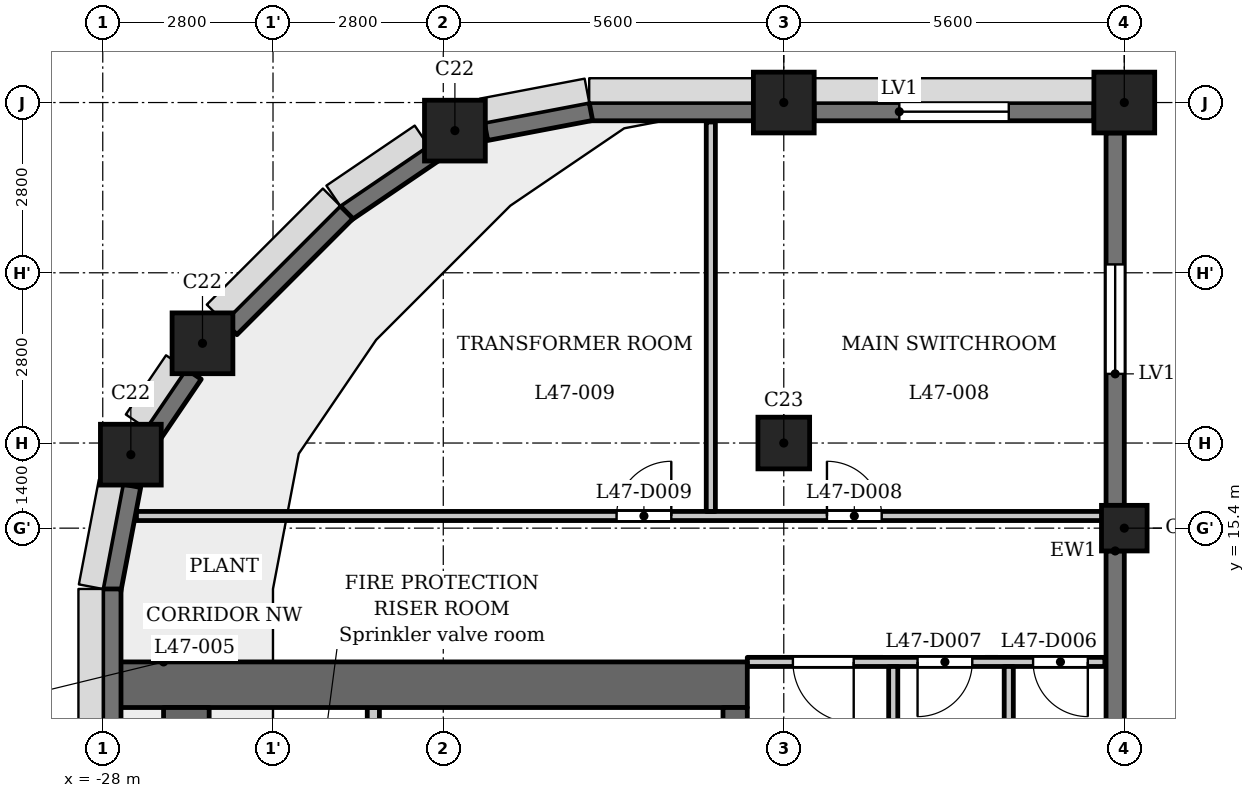
"""IFC4 building model, lengths in metres.
Left out: names, types, materials, properties, quantities, classifications, styles, units other than length and angle.
Written with IfcOpenShell. Run it as: python <this file> out.ifc"""

import sys

from ifc_helpers import new_model, si_unit, direction, frame, frame_2d, origin, origin_2d, place, context, subcontext, project, spatial, rectangle, extrude, element, fill, save


model = new_model("IFC4")
c1 = context("Model", 3, precision=1e-05, world=origin(), true_north=direction((0.0, 1.0)))
c2 = subcontext(c1, "Body", "Model", "MODEL_VIEW")
j1 = project(units=[si_unit("LENGTHUNIT", "METRE"), si_unit("PLANEANGLEUNIT", "RADIAN")], contexts=[c1])
p1 = place(None, origin())
s1 = spatial("IfcSite", under=j1, at=p1, CompositionType="ELEMENT")
p2 = place(p1, origin())
s2 = spatial("IfcBuilding", under=s1, at=p2, CompositionType="ELEMENT")
p3 = place(p2, frame((0.0, 0.0, 183.5)))
s3 = spatial("IfcBuildingStorey", under=s2, at=p3, CompositionType="ELEMENT", Elevation=183.5)
for number, where, z_axis, x_axis in (
    (1, (-11.2, 22.4, 0.0), (0.0, 0.0, 1.0), (1.0, 0.0, 0.0)),
    (2, (-16.8, 22.4, 0.0), (0.0, 0.0, 1.0), (1.0, 0.0, 0.0)),
    (3, (-22.209, 21.938, 0.0), (0.0, 0.0, 1.0), (1.0, 0.0, 0.0)),
    (4, (-26.36, 18.44, 0.0), (0.0, 0.0, 1.0), (1.0, 0.0, 0.0)),
    (5, (-27.538, 16.609, 0.0), (0.0, 0.0, 1.0), (1.0, 0.0, 0.0)),
):
    element("IfcColumn", number, at=place(p3, frame(where, z_axis=z_axis, x_axis=x_axis)), inside=s3, PredefinedType="COLUMN", context=c2, shape_type="SweptSolid", body=[
        extrude(rectangle(XDim=1.0, YDim=1.0, at=origin_2d()), origin(), (0.0, 0.0, 1.0), 5.4),
    ])
p4 = place(p3, frame((-16.8, 16.8, 0.0), z_axis=(0.0, 0.0, 1.0), x_axis=(1.0, 0.0, 0.0)))
e6 = element("IfcColumn", 6, at=p4, inside=s3, PredefinedType="COLUMN", context=c2, shape_type="SweptSolid", body=[
    extrude(rectangle(XDim=0.85, YDim=0.85, at=origin_2d()), origin(), (0.0, 0.0, 1.0), 5.4),
])
p5 = place(p3, frame((-11.2, 15.4, 0.0), z_axis=(0.0, 0.0, 1.0), x_axis=(1.0, 0.0, 0.0)))
e7 = element("IfcColumn", 7, at=p5, inside=s3, PredefinedType="COLUMN", context=c2, shape_type="SweptSolid", body=[
    extrude(rectangle(XDim=0.75, YDim=0.75, at=origin_2d()), origin(), (0.0, 0.0, 1.0), 5.4),
])
p6 = place(p3, frame((-11.35, 8.825, 0.0), z_axis=(0.0, 0.0, 1.0), x_axis=(0.0, 1.0, 0.0)))
e8 = element("IfcWall", 8, at=p6, inside=s3, PredefinedType="SOLIDWALL", context=c2, shape_type="SweptSolid", body=[
    extrude(rectangle(XDim=6.2, YDim=0.3, at=frame_2d((3.1, 0.0))), origin(), (0.0, 0.0, 1.0), 4.6),
])
p7 = place(p6, frame((1.25, 0.0, 0.9)))
e9 = element("IfcOpeningElement", 9, at=p7, cuts=e8, PredefinedType="OPENING", context=c2, shape_type="SweptSolid", body=[
    extrude(rectangle(XDim=1.8, YDim=1.5, at=frame_2d((0.9, 0.75))), frame((0.0, 0.16, 0.0), z_axis=(0.0, -1.0, 0.0), x_axis=(1.0, 0.0, 0.0)), (0.0, 0.0, 1.0), 0.32),
])
p8 = place(p3, frame((-11.35, 15.775, 0.0), z_axis=(0.0, 0.0, 1.0), x_axis=(0.0, 1.0, 0.0)))
e10 = element("IfcWall", 10, at=p8, inside=s3, PredefinedType="SOLIDWALL", context=c2, shape_type="SweptSolid", body=[
    extrude(rectangle(XDim=6.125, YDim=0.3, at=frame_2d((3.062, 0.0))), origin(), (0.0, 0.0, 1.0), 4.6),
])
p9 = place(p8, frame((2.163, 0.0, 0.9)))
e11 = element("IfcOpeningElement", 11, at=p9, cuts=e10, PredefinedType="OPENING", context=c2, shape_type="SweptSolid", body=[
    extrude(rectangle(XDim=1.8, YDim=1.5, at=frame_2d((0.9, 0.75))), frame((0.0, 0.16, 0.0), z_axis=(0.0, -1.0, 0.0), x_axis=(1.0, 0.0, 0.0)), (0.0, 0.0, 1.0), 0.32),
])
p10 = place(p3, frame((-11.7, 22.25, 0.0), z_axis=(0.0, 0.0, 1.0), x_axis=(-1.0, 0.0, 0.0)))
e12 = element("IfcWall", 12, at=p10, inside=s3, PredefinedType="SOLIDWALL", context=c2, shape_type="SweptSolid", body=[
    extrude(rectangle(XDim=4.6, YDim=0.3, at=frame_2d((2.3, 0.0))), origin(), (0.0, 0.0, 1.0), 2.6),
])
p11 = place(p10, frame((1.4, 0.0, 0.9)))
e13 = element("IfcOpeningElement", 13, at=p11, cuts=e12, PredefinedType="OPENING", context=c2, shape_type="SweptSolid", body=[
    extrude(rectangle(XDim=1.8, YDim=1.5, at=frame_2d((0.9, 0.75))), frame((0.0, 0.16, 0.0), z_axis=(0.0, -1.0, 0.0), x_axis=(1.0, 0.0, 0.0)), (0.0, 0.0, 1.0), 0.32),
])
p12 = place(p3, frame((-17.3, 22.25, 0.0), z_axis=(0.0, 0.0, 1.0), x_axis=(-1.0, 0.0, 0.0)))
e14 = element("IfcWall", 14, at=p12, inside=s3, PredefinedType="SOLIDWALL", context=c2, shape_type="SweptSolid", body=[
    extrude(rectangle(XDim=2.7, YDim=0.3, at=frame_2d((1.35, 0.0))), origin(), (0.0, 0.0, 1.0), 2.6),
])
for number, where, z_axis, x_axis in (
    (15, (-19.972, 22.253, 0.0), (0.0, 0.0, 1.0), (-0.982, -0.187, 0.0)),
    (16, (-22.56, 21.566, 0.0), (0.0, 0.0, 1.0), (-0.827, -0.562, 0.0)),
):
    element("IfcWall", number, at=place(p3, frame(where, z_axis=z_axis, x_axis=x_axis)), inside=s3, PredefinedType="SOLIDWALL", context=c2, shape_type="SweptSolid", body=[
        extrude(rectangle(XDim=1.756, YDim=0.3, at=frame_2d((0.878, 0.0))), origin(), (0.0, 0.0, 1.0), 2.6),
    ])
p13 = place(p3, frame((-23.991, 20.597, 0.0), z_axis=(0.0, 0.0, 1.0), x_axis=(-0.707106781187, -0.707106781187, 0.0)))
e17 = element("IfcWall", 17, at=p13, inside=s3, PredefinedType="SOLIDWALL", context=c2, shape_type="SweptSolid", body=[
    extrude(rectangle(XDim=2.7, YDim=0.3, at=frame_2d((1.35, 0.0))), origin(), (0.0, 0.0, 1.0), 2.6),
])
p14 = place(p3, frame((-26.504, 17.934, 0.0), z_axis=(0.0, 0.0, 1.0), x_axis=(-0.562145470373, -0.827038372833, 0.0)))
e18 = element("IfcWall", 18, at=p14, inside=s3, PredefinedType="SOLIDWALL", context=c2, shape_type="SweptSolid", body=[
    extrude(rectangle(XDim=1.177, YDim=0.3, at=frame_2d((0.588, 0.0))), origin(), (0.0, 0.0, 1.0), 4.6),
])
p15 = place(p3, frame((-27.524, 16.097, 0.0), z_axis=(0.0, 0.0, 1.0), x_axis=(-0.187259034321, -0.982310569049, 0.0)))
e19 = element("IfcWall", 19, at=p15, inside=s3, PredefinedType="SOLIDWALL", context=c2, shape_type="SweptSolid", body=[
    extrude(rectangle(XDim=1.756, YDim=0.3, at=frame_2d((0.878, 0.0))), origin(), (0.0, 0.0, 1.0), 2.6),
])
p16 = place(p3, frame((-27.85, 14.4, 0.0), z_axis=(0.0, 0.0, 1.0), x_axis=(0.0, -1.0, 0.0)))
e20 = element("IfcWall", 20, at=p16, inside=s3, PredefinedType="SOLIDWALL", context=c2, shape_type="SweptSolid", body=[
    extrude(rectangle(XDim=2.7, YDim=0.3, at=frame_2d((1.35, 0.0))), origin(), (0.0, 0.0, 1.0), 2.6),
])
p17 = place(p3, frame((-17.4, 12.825, 0.0), z_axis=(0.0, 0.0, 1.0), x_axis=(-1.0, 0.0, 0.0)))
e21 = element("IfcWall", 21, at=p17, inside=s3, PredefinedType="SHEAR", context=c2, shape_type="SweptSolid", body=[
    extrude(rectangle(XDim=10.4, YDim=0.75, at=frame_2d((5.2, 0.0))), origin(), (0.0, 0.0, 1.0), 4.6),
])
p18 = place(p3, frame((-17.6, -12.45, 0.0), z_axis=(0.0, 0.0, 1.0), x_axis=(0.0, 1.0, 0.0)))
e22 = element("IfcWall", 22, at=p18, inside=s3, PredefinedType="SHEAR", context=c2, shape_type="SweptSolid", body=[
    extrude(rectangle(XDim=24.9, YDim=0.4, at=frame_2d((12.45, 0.0))), origin(), (0.0, 0.0, 1.0), 4.6),
])
p19 = place(p18, frame((8.65, 0.0, 0.0)))
e23 = element("IfcOpeningElement", 23, at=p19, cuts=e22, PredefinedType="OPENING", context=c2, shape_type="SweptSolid", body=[
    extrude(rectangle(XDim=0.9, YDim=2.1, at=frame_2d((0.45, 1.05))), frame((0.0, 0.21, 0.0), z_axis=(0.0, -1.0, 0.0), x_axis=(1.0, 0.0, 0.0)), (0.0, 0.0, 1.0), 0.42),
])
p20 = place(p18, frame((15.6, 0.0, 0.0)))
e24 = element("IfcOpeningElement", 24, at=p20, cuts=e22, PredefinedType="OPENING", context=c2, shape_type="SweptSolid", body=[
    extrude(rectangle(XDim=1.1, YDim=2.1, at=frame_2d((0.55, 1.05))), frame((0.0, 0.21, 0.0), z_axis=(0.0, -1.0, 0.0), x_axis=(1.0, 0.0, 0.0)), (0.0, 0.0, 1.0), 0.42),
])
p21 = place(p18, frame((18.0, 0.0, 0.0)))
e25 = element("IfcOpeningElement", 25, at=p21, cuts=e22, PredefinedType="OPENING", context=c2, shape_type="SweptSolid", body=[
    extrude(rectangle(XDim=1.1, YDim=2.1, at=frame_2d((0.55, 1.05))), frame((0.0, 0.21, 0.0), z_axis=(0.0, -1.0, 0.0), x_axis=(1.0, 0.0, 0.0)), (0.0, 0.0, 1.0), 0.42),
])
p22 = place(p18, frame((23.025, 0.0, 0.0)))
e26 = element("IfcOpeningElement", 26, at=p22, cuts=e22, PredefinedType="OPENING", context=c2, shape_type="SweptSolid", body=[
    extrude(rectangle(XDim=1.1, YDim=2.1, at=frame_2d((0.55, 1.05))), frame((0.0, 0.21, 0.0), z_axis=(0.0, -1.0, 0.0), x_axis=(1.0, 0.0, 0.0)), (0.0, 0.0, 1.0), 0.42),
])
p23 = place(p18, frame((0.775, 0.0, 0.0)))
e27 = element("IfcOpeningElement", 27, at=p23, cuts=e22, PredefinedType="OPENING", context=c2, shape_type="SweptSolid", body=[
    extrude(rectangle(XDim=1.1, YDim=2.1, at=frame_2d((0.55, 1.05))), frame((0.0, 0.21, 0.0), z_axis=(0.0, -1.0, 0.0), x_axis=(1.0, 0.0, 0.0)), (0.0, 0.0, 1.0), 0.42),
])
p24 = place(p18, frame((12.925, 0.0, 0.0)))
e28 = element("IfcOpeningElement", 28, at=p24, cuts=e22, PredefinedType="OPENING", context=c2, shape_type="SweptSolid", body=[
    extrude(rectangle(XDim=1.8, YDim=2.1, at=frame_2d((0.9, 1.05))), frame((0.0, 0.21, 0.0), z_axis=(0.0, -1.0, 0.0), x_axis=(1.0, 0.0, 0.0)), (0.0, 0.0, 1.0), 0.42),
])
p25 = place(p3, frame((-26.625, -12.45, 0.0), z_axis=(0.0, 0.0, 1.0), x_axis=(0.0, 1.0, 0.0)))
e29 = element("IfcWall", 29, at=p25, inside=s3, PredefinedType="SHEAR", context=c2, shape_type="SweptSolid", body=[
    extrude(rectangle(XDim=24.9, YDim=0.75, at=frame_2d((12.45, 0.0))), origin(), (0.0, 0.0, 1.0), 4.6),
])
p26 = place(p3, frame((-23.55, 9.8, 0.0), z_axis=(0.0, 0.0, 1.0), x_axis=(0.0, 1.0, 0.0)))
e30 = element("IfcWall", 30, at=p26, inside=s3, PredefinedType="PARTITIONING", context=c2, shape_type="SweptSolid", body=[
    extrude(rectangle(XDim=2.65, YDim=0.2, at=frame_2d((1.325, 0.0))), origin(), (0.0, 0.0, 1.0), 4.6),
])
p27 = place(p26, frame((0.875, 0.0, 0.0)))
e31 = element("IfcOpeningElement", 31, at=p27, cuts=e30, PredefinedType="OPENING", context=c2, shape_type="SweptSolid", body=[
    extrude(rectangle(XDim=0.9, YDim=2.1, at=frame_2d((0.45, 1.05))), frame((0.0, 0.11, 0.0), z_axis=(0.0, -1.0, 0.0), x_axis=(1.0, 0.0, 0.0)), (0.0, 0.0, 1.0), 0.22),
])
p28 = place(p3, frame((-17.4, 13.2, 0.0), z_axis=(0.0, 0.0, 1.0), x_axis=(1.0, 0.0, 0.0)))
e32 = element("IfcWall", 32, at=p28, inside=s3, PredefinedType="PARTITIONING", context=c2, shape_type="SweptSolid", body=[
    extrude(rectangle(XDim=5.88, YDim=0.15, at=frame_2d((2.94, 0.0))), origin(), (0.0, 0.0, 1.0), 4.6),
])
p29 = place(p28, frame((0.75, 0.0, 0.0)))
e33 = element("IfcOpeningElement", 33, at=p29, cuts=e32, PredefinedType="OPENING", context=c2, shape_type="SweptSolid", body=[
    extrude(rectangle(XDim=1.0, YDim=2.1, at=frame_2d((0.5, 1.05))), frame((0.0, 0.085, 0.0), z_axis=(0.0, -1.0, 0.0), x_axis=(1.0, 0.0, 0.0)), (0.0, 0.0, 1.0), 0.17),
])
p30 = place(p28, frame((4.7, 0.0, 0.0)))
e34 = element("IfcOpeningElement", 34, at=p30, cuts=e32, PredefinedType="OPENING", context=c2, shape_type="SweptSolid", body=[
    extrude(rectangle(XDim=0.9, YDim=2.1, at=frame_2d((0.45, 1.05))), frame((0.0, 0.085, 0.0), z_axis=(0.0, -1.0, 0.0), x_axis=(1.0, 0.0, 0.0)), (0.0, 0.0, 1.0), 0.17),
])
p31 = place(p28, frame((2.8, 0.0, 0.0)))
e35 = element("IfcOpeningElement", 35, at=p31, cuts=e32, PredefinedType="OPENING", context=c2, shape_type="SweptSolid", body=[
    extrude(rectangle(XDim=0.9, YDim=2.1, at=frame_2d((0.45, 1.05))), frame((0.0, 0.085, 0.0), z_axis=(0.0, -1.0, 0.0), x_axis=(1.0, 0.0, 0.0)), (0.0, 0.0, 1.0), 0.17),
])
p32 = place(p3, frame((-27.446, 15.6, 0.0), z_axis=(0.0, 0.0, 1.0), x_axis=(1.0, 0.0, 0.0)))
e36 = element("IfcWall", 36, at=p32, inside=s3, PredefinedType="PARTITIONING", context=c2, shape_type="SweptSolid", body=[
    extrude(rectangle(XDim=16.156, YDim=0.15, at=frame_2d((8.078, 0.0))), origin(), (0.0, 0.0, 1.0), 4.6),
])
p33 = place(p32, frame((11.356, 0.0, 0.0)))
e37 = element("IfcOpeningElement", 37, at=p33, cuts=e36, PredefinedType="OPENING", context=c2, shape_type="SweptSolid", body=[
    extrude(rectangle(XDim=0.9, YDim=2.1, at=frame_2d((0.45, 1.05))), frame((0.0, 0.085, 0.0), z_axis=(0.0, -1.0, 0.0), x_axis=(1.0, 0.0, 0.0)), (0.0, 0.0, 1.0), 0.17),
])
p34 = place(p32, frame((7.896, 0.0, 0.0)))
e38 = element("IfcOpeningElement", 38, at=p34, cuts=e36, PredefinedType="OPENING", context=c2, shape_type="SweptSolid", body=[
    extrude(rectangle(XDim=0.9, YDim=2.1, at=frame_2d((0.45, 1.05))), frame((0.0, 0.085, 0.0), z_axis=(0.0, -1.0, 0.0), x_axis=(1.0, 0.0, 0.0)), (0.0, 0.0, 1.0), 0.17),
])
p35 = place(p3, frame((-18.0, 15.675, 0.0), z_axis=(0.0, 0.0, 1.0), x_axis=(0.0, 1.0, 0.0)))
e39 = element("IfcWall", 39, at=p35, inside=s3, PredefinedType="PARTITIONING", context=c2, shape_type="SweptSolid", body=[
    extrude(rectangle(XDim=6.405, YDim=0.15, at=frame_2d((3.203, 0.0))), origin(), (0.0, 0.0, 1.0), 4.6),
])
p36 = place(p3, frame((-15.0, 6.769, 0.0), z_axis=(0.0, 0.0, 1.0), x_axis=(0.0, 1.0, 0.0)))
e40 = element("IfcWall", 40, at=p36, inside=s3, PredefinedType="PARTITIONING", context=c2, shape_type="SweptSolid", body=[
    extrude(rectangle(XDim=6.356, YDim=0.15, at=frame_2d((3.178, 0.0))), origin(), (0.0, 0.0, 1.0), 4.6),
])
p37 = place(p3, frame((-13.1, 7.32, 0.0), z_axis=(0.0, 0.0, 1.0), x_axis=(0.0, 1.0, 0.0)))
e41 = element("IfcWall", 41, at=p37, inside=s3, PredefinedType="PARTITIONING", context=c2, shape_type="SweptSolid", body=[
    extrude(rectangle(XDim=5.805, YDim=0.15, at=frame_2d((2.902, 0.0))), origin(), (0.0, 0.0, 1.0), 4.6),
])
p38 = place(p29, origin())
e42 = element("IfcDoor", 42, at=p38, inside=s3, OperationType="SINGLE_SWING_RIGHT", PredefinedType="DOOR", context=c2, shape_type="SweptSolid", body=[
    extrude(rectangle(XDim=1.0, YDim=2.1, at=frame_2d((0.5, 1.05))), frame((0.0, 0.025, 0.0), z_axis=(0.0, -1.0, 0.0), x_axis=(1.0, 0.0, 0.0)), (0.0, 0.0, 1.0), 0.05),
])
fill(e33, e42)
p39 = place(p30, origin())
e43 = element("IfcDoor", 43, at=p39, inside=s3, OperationType="SINGLE_SWING_RIGHT", PredefinedType="DOOR", context=c2, shape_type="SweptSolid", body=[
    extrude(rectangle(XDim=0.9, YDim=2.1, at=frame_2d((0.45, 1.05))), frame((0.0, 0.025, 0.0), z_axis=(0.0, -1.0, 0.0), x_axis=(1.0, 0.0, 0.0)), (0.0, 0.0, 1.0), 0.05),
])
fill(e34, e43)
p40 = place(p31, origin())
e44 = element("IfcDoor", 44, at=p40, inside=s3, OperationType="SINGLE_SWING_LEFT", PredefinedType="DOOR", context=c2, shape_type="SweptSolid", body=[
    extrude(rectangle(XDim=0.9, YDim=2.1, at=frame_2d((0.45, 1.05))), frame((0.0, 0.025, 0.0), z_axis=(0.0, -1.0, 0.0), x_axis=(1.0, 0.0, 0.0)), (0.0, 0.0, 1.0), 0.05),
])
fill(e35, e44)
p41 = place(p33, origin())
e45 = element("IfcDoor", 45, at=p41, inside=s3, OperationType="SINGLE_SWING_RIGHT", PredefinedType="DOOR", context=c2, shape_type="SweptSolid", body=[
    extrude(rectangle(XDim=0.9, YDim=2.1, at=frame_2d((0.45, 1.05))), frame((0.0, 0.025, 0.0), z_axis=(0.0, -1.0, 0.0), x_axis=(1.0, 0.0, 0.0)), (0.0, 0.0, 1.0), 0.05),
])
fill(e37, e45)
p42 = place(p34, origin())
e46 = element("IfcDoor", 46, at=p42, inside=s3, OperationType="SINGLE_SWING_LEFT", PredefinedType="DOOR", context=c2, shape_type="SweptSolid", body=[
    extrude(rectangle(XDim=0.9, YDim=2.1, at=frame_2d((0.45, 1.05))), frame((0.0, 0.025, 0.0), z_axis=(0.0, -1.0, 0.0), x_axis=(1.0, 0.0, 0.0)), (0.0, 0.0, 1.0), 0.05),
])
fill(e38, e46)
p43 = place(p9, origin())
e47 = element("IfcWindow", 47, at=p43, inside=s3, PartitioningType="SINGLE_PANEL", PredefinedType="WINDOW", context=c2, shape_type="SweptSolid", body=[
    extrude(rectangle(XDim=1.8, YDim=1.5, at=frame_2d((0.9, 0.75))), frame((0.0, 0.03, 0.0), z_axis=(0.0, -1.0, 0.0), x_axis=(1.0, 0.0, 0.0)), (0.0, 0.0, 1.0), 0.06),
])
fill(e11, e47)
p44 = place(p11, origin())
e48 = element("IfcWindow", 48, at=p44, inside=s3, PartitioningType="SINGLE_PANEL", PredefinedType="WINDOW", context=c2, shape_type="SweptSolid", body=[
    extrude(rectangle(XDim=1.8, YDim=1.5, at=frame_2d((0.9, 0.75))), frame((0.0, 0.03, 0.0), z_axis=(0.0, -1.0, 0.0), x_axis=(1.0, 0.0, 0.0)), (0.0, 0.0, 1.0), 0.06),
])
fill(e13, e48)
save(model, sys.argv[1])
